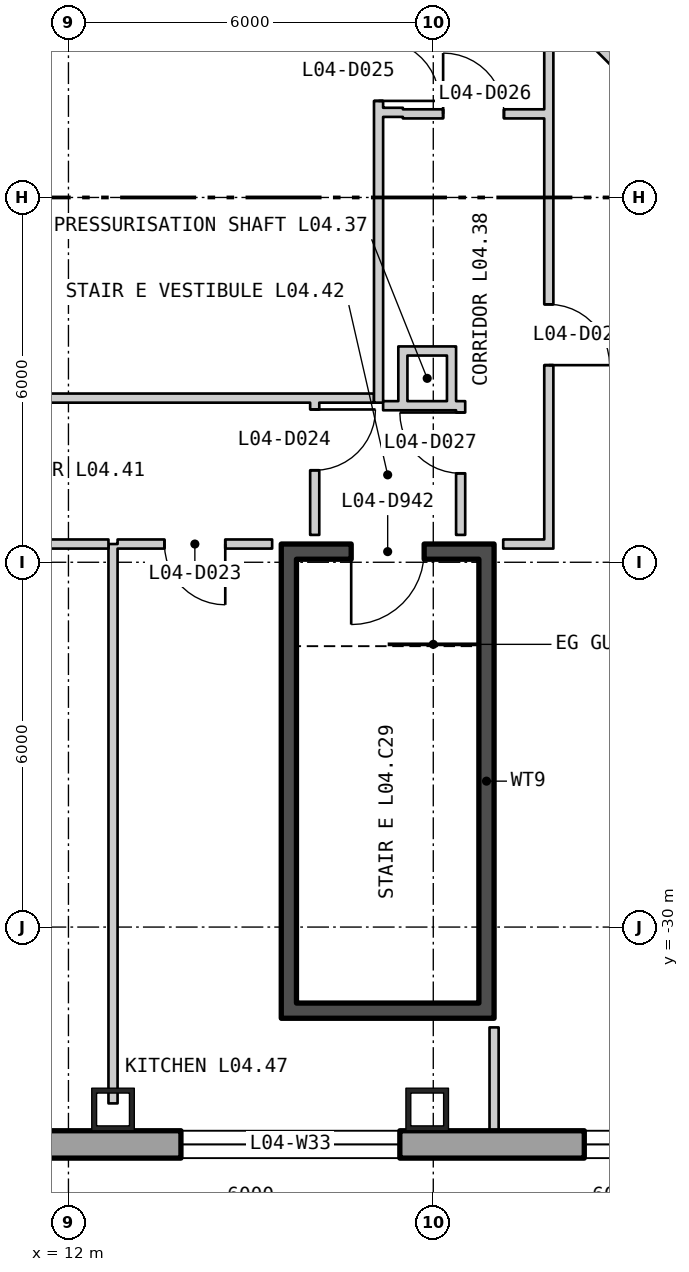
"""IFC4 building model, lengths in metres.
Left out: names, types, materials, properties, quantities, classifications, styles, units other than length and angle.
Written with IfcOpenShell. Run it as: python <this file> out.ifc"""

import sys

from ifc_helpers import new_model, si_unit, direction, frame, frame_2d, origin, origin_2d, place, context, subcontext, project, spatial, polyline, rectangle, hollow_rectangle, outline, extrude, element, fill, save


model = new_model("IFC4")
c1 = context("Model", 3, precision=1e-05, world=origin(), true_north=direction((0.0, 1.0)))
c2 = subcontext(c1, "Body", "Model", "MODEL_VIEW")
j1 = project(units=[si_unit("LENGTHUNIT", "METRE"), si_unit("PLANEANGLEUNIT", "RADIAN")], contexts=[c1])
p1 = place(None, origin())
s1 = spatial("IfcSite", under=j1, at=p1, CompositionType="ELEMENT")
p2 = place(p1, origin())
s2 = spatial("IfcBuilding", under=s1, at=p2, CompositionType="ELEMENT")
p3 = place(p2, frame((0.0, 0.0, 23.7)))
s3 = spatial("IfcBuildingStorey", under=s2, at=p3, CompositionType="ELEMENT", Elevation=23.7)
for number, where, z_axis, x_axis in (
    (1, (12.733, -33.0, 0.0), (0.0, 0.0, 1.0), (1.0, 0.0, 0.0)),
    (2, (17.9, -33.0, 0.0), (0.0, 0.0, 1.0), (1.0, 0.0, 0.0)),
):
    element("IfcColumn", number, at=place(p3, frame(where, z_axis=z_axis, x_axis=x_axis)), inside=s3, PredefinedType="COLUMN", context=c2, shape_type="SweptSolid", body=[
        extrude(hollow_rectangle(XDim=0.7, YDim=0.7, WallThickness=0.08, at=origin_2d()), origin(), (0.0, 0.0, 1.0), 4.85),
    ])
p4 = place(p3, frame((-38.775, -33.575, -0.4), z_axis=(0.0, 0.0, 1.0), x_axis=(1.0, 0.0, 0.0)))
e3 = element("IfcWall", 3, at=p4, inside=s3, PredefinedType="SOLIDWALL", context=c2, shape_type="SweptSolid", body=[
    extrude(outline(polyline([(-0.225, -0.225), (77.775, -0.225), (77.325, 0.225), (0.225, 0.225), (-0.225, -0.225)])), origin(), (0.0, 0.0, 1.0), 5.1),
])
p5 = place(p4, frame((1.958, 0.0, 1.3)))
e4 = element("IfcOpeningElement", 4, at=p5, cuts=e3, PredefinedType="OPENING", context=c2, shape_type="SweptSolid", body=[
    extrude(rectangle(XDim=3.6, YDim=3.2, at=frame_2d((1.8, 1.6))), frame((0.0, 0.235, 0.0), z_axis=(0.0, -1.0, 0.0), x_axis=(1.0, 0.0, 0.0)), (0.0, 0.0, 1.0), 0.47),
])
p6 = place(p4, frame((8.325, 0.0, 1.3)))
e5 = element("IfcOpeningElement", 5, at=p6, cuts=e3, PredefinedType="OPENING", context=c2, shape_type="SweptSolid", body=[
    extrude(rectangle(XDim=3.6, YDim=3.2, at=frame_2d((1.8, 1.6))), frame((0.0, 0.235, 0.0), z_axis=(0.0, -1.0, 0.0), x_axis=(1.0, 0.0, 0.0)), (0.0, 0.0, 1.0), 0.47),
])
p7 = place(p4, frame((14.692, 0.0, 1.3)))
e6 = element("IfcOpeningElement", 6, at=p7, cuts=e3, PredefinedType="OPENING", context=c2, shape_type="SweptSolid", body=[
    extrude(rectangle(XDim=3.6, YDim=3.2, at=frame_2d((1.8, 1.6))), frame((0.0, 0.235, 0.0), z_axis=(0.0, -1.0, 0.0), x_axis=(1.0, 0.0, 0.0)), (0.0, 0.0, 1.0), 0.47),
])
p8 = place(p4, frame((21.325, 0.0, 1.3)))
e7 = element("IfcOpeningElement", 7, at=p8, cuts=e3, PredefinedType="OPENING", context=c2, shape_type="SweptSolid", body=[
    extrude(rectangle(XDim=3.6, YDim=3.2, at=frame_2d((1.8, 1.6))), frame((0.0, 0.235, 0.0), z_axis=(0.0, -1.0, 0.0), x_axis=(1.0, 0.0, 0.0)), (0.0, 0.0, 1.0), 0.47),
])
p9 = place(p4, frame((27.425, 0.0, 1.3)))
e8 = element("IfcOpeningElement", 8, at=p9, cuts=e3, PredefinedType="OPENING", context=c2, shape_type="SweptSolid", body=[
    extrude(rectangle(XDim=3.6, YDim=3.2, at=frame_2d((1.8, 1.6))), frame((0.0, 0.235, 0.0), z_axis=(0.0, -1.0, 0.0), x_axis=(1.0, 0.0, 0.0)), (0.0, 0.0, 1.0), 0.47),
])
p10 = place(p4, frame((33.792, 0.0, 1.3)))
e9 = element("IfcOpeningElement", 9, at=p10, cuts=e3, PredefinedType="OPENING", context=c2, shape_type="SweptSolid", body=[
    extrude(rectangle(XDim=3.6, YDim=3.2, at=frame_2d((1.8, 1.6))), frame((0.0, 0.235, 0.0), z_axis=(0.0, -1.0, 0.0), x_axis=(1.0, 0.0, 0.0)), (0.0, 0.0, 1.0), 0.47),
])
p11 = place(p4, frame((40.158, 0.0, 1.3)))
e10 = element("IfcOpeningElement", 10, at=p11, cuts=e3, PredefinedType="OPENING", context=c2, shape_type="SweptSolid", body=[
    extrude(rectangle(XDim=3.6, YDim=3.2, at=frame_2d((1.8, 1.6))), frame((0.0, 0.235, 0.0), z_axis=(0.0, -1.0, 0.0), x_axis=(1.0, 0.0, 0.0)), (0.0, 0.0, 1.0), 0.47),
])
p12 = place(p4, frame((46.525, 0.0, 1.3)))
e11 = element("IfcOpeningElement", 11, at=p12, cuts=e3, PredefinedType="OPENING", context=c2, shape_type="SweptSolid", body=[
    extrude(rectangle(XDim=3.6, YDim=3.2, at=frame_2d((1.8, 1.6))), frame((0.0, 0.235, 0.0), z_axis=(0.0, -1.0, 0.0), x_axis=(1.0, 0.0, 0.0)), (0.0, 0.0, 1.0), 0.47),
])
p13 = place(p4, frame((52.625, 0.0, 1.3)))
e12 = element("IfcOpeningElement", 12, at=p13, cuts=e3, PredefinedType="OPENING", context=c2, shape_type="SweptSolid", body=[
    extrude(rectangle(XDim=3.6, YDim=3.2, at=frame_2d((1.8, 1.6))), frame((0.0, 0.235, 0.0), z_axis=(0.0, -1.0, 0.0), x_axis=(1.0, 0.0, 0.0)), (0.0, 0.0, 1.0), 0.47),
])
p14 = place(p4, frame((59.258, 0.0, 1.3)))
e13 = element("IfcOpeningElement", 13, at=p14, cuts=e3, PredefinedType="OPENING", context=c2, shape_type="SweptSolid", body=[
    extrude(rectangle(XDim=3.6, YDim=3.2, at=frame_2d((1.8, 1.6))), frame((0.0, 0.235, 0.0), z_axis=(0.0, -1.0, 0.0), x_axis=(1.0, 0.0, 0.0)), (0.0, 0.0, 1.0), 0.47),
])
p15 = place(p4, frame((65.625, 0.0, 1.3)))
e14 = element("IfcOpeningElement", 14, at=p15, cuts=e3, PredefinedType="OPENING", context=c2, shape_type="SweptSolid", body=[
    extrude(rectangle(XDim=3.6, YDim=3.2, at=frame_2d((1.8, 1.6))), frame((0.0, 0.235, 0.0), z_axis=(0.0, -1.0, 0.0), x_axis=(1.0, 0.0, 0.0)), (0.0, 0.0, 1.0), 0.47),
])
p16 = place(p4, frame((71.992, 0.0, 1.3)))
e15 = element("IfcOpeningElement", 15, at=p16, cuts=e3, PredefinedType="OPENING", context=c2, shape_type="SweptSolid", body=[
    extrude(rectangle(XDim=3.6, YDim=3.2, at=frame_2d((1.8, 1.6))), frame((0.0, 0.235, 0.0), z_axis=(0.0, -1.0, 0.0), x_axis=(1.0, 0.0, 0.0)), (0.0, 0.0, 1.0), 0.47),
])
for number, where, z_axis, x_axis in (
    (16, (15.625, -31.25, 0.0), (0.0, 0.0, 1.0), (0.0, 1.0, 0.0)),
    (17, (18.875, -31.25, 0.0), (0.0, 0.0, 1.0), (0.0, 1.0, 0.0)),
):
    element("IfcWall", number, at=place(p3, frame(where, z_axis=z_axis, x_axis=x_axis)), inside=s3, PredefinedType="SHEAR", context=c2, shape_type="SweptSolid", body=[
        extrude(rectangle(XDim=7.3, YDim=0.25, at=frame_2d((3.65, 0.0))), origin(), (0.0, 0.0, 1.0), 4.85),
    ])
p17 = place(p3, frame((15.5, -31.375, 0.0), z_axis=(0.0, 0.0, 1.0), x_axis=(1.0, 0.0, 0.0)))
e18 = element("IfcWall", 18, at=p17, inside=s3, PredefinedType="SHEAR", context=c2, shape_type="SweptSolid", body=[
    extrude(rectangle(XDim=3.5, YDim=0.25, at=frame_2d((1.75, 0.0))), origin(), (0.0, 0.0, 1.0), 4.85),
])
p18 = place(p3, frame((15.5, -23.825, 0.0), z_axis=(0.0, 0.0, 1.0), x_axis=(1.0, 0.0, 0.0)))
e19 = element("IfcWall", 19, at=p18, inside=s3, PredefinedType="SHEAR", context=c2, shape_type="SweptSolid", body=[
    extrude(rectangle(XDim=3.5, YDim=0.25, at=frame_2d((1.75, 0.0))), origin(), (0.0, 0.0, 1.0), 4.85),
])
p19 = place(p18, frame((1.15, 0.0, 0.0)))
e20 = element("IfcOpeningElement", 20, at=p19, cuts=e19, PredefinedType="OPENING", context=c2, shape_type="SweptSolid", body=[
    extrude(rectangle(XDim=1.2, YDim=2.1, at=frame_2d((0.6, 1.05))), frame((0.0, 0.135, 0.0), z_axis=(0.0, -1.0, 0.0), x_axis=(1.0, 0.0, 0.0)), (0.0, 0.0, 1.0), 0.27),
])
p20 = place(p3, frame((1.7, -21.3, 0.0), z_axis=(0.0, 0.0, 1.0), x_axis=(1.0, 0.0, 0.0)))
e21 = element("IfcWall", 21, at=p20, inside=s3, PredefinedType="PARTITIONING", context=c2, shape_type="SweptSolid", body=[
    extrude(rectangle(XDim=15.325, YDim=0.15, at=frame_2d((7.662, 0.0))), origin(), (0.0, 0.0, 1.0), 4.85),
])
p21 = place(p3, frame((6.442, -23.7, 0.0), z_axis=(0.0, 0.0, 1.0), x_axis=(1.0, 0.0, 0.0)))
e22 = element("IfcWall", 22, at=p21, inside=s3, PredefinedType="PARTITIONING", context=c2, shape_type="SweptSolid", body=[
    extrude(rectangle(XDim=6.216, YDim=0.15, at=frame_2d((3.108, 0.0))), origin(), (0.0, 0.0, 1.0), 4.85),
])
p22 = place(p21, frame((1.805, 0.0, 0.0)))
e23 = element("IfcOpeningElement", 23, at=p22, cuts=e22, PredefinedType="OPENING", context=c2, shape_type="SweptSolid", body=[
    extrude(rectangle(XDim=1.0, YDim=2.1, at=frame_2d((0.5, 1.05))), frame((0.0, 0.085, 0.0), z_axis=(0.0, -1.0, 0.0), x_axis=(1.0, 0.0, 0.0)), (0.0, 0.0, 1.0), 0.17),
])
p23 = place(p3, frame((12.733, -32.9, 0.0), z_axis=(0.0, 0.0, 1.0), x_axis=(0.0, 1.0, 0.0)))
e24 = element("IfcWall", 24, at=p23, inside=s3, PredefinedType="PARTITIONING", context=c2, shape_type="SweptSolid", body=[
    extrude(rectangle(XDim=9.2, YDim=0.15, at=frame_2d((4.6, 0.0))), origin(), (0.0, 0.0, 1.0), 4.16),
])
p24 = place(p3, frame((12.808, -23.7, 0.0), z_axis=(0.0, 0.0, 1.0), x_axis=(1.0, 0.0, 0.0)))
e25 = element("IfcWall", 25, at=p24, inside=s3, PredefinedType="PARTITIONING", context=c2, shape_type="SweptSolid", body=[
    extrude(rectangle(XDim=2.542, YDim=0.15, at=frame_2d((1.271, 0.0))), origin(), (0.0, 0.0, 1.0), 4.85),
])
p25 = place(p24, frame((0.771, 0.0, 0.0)))
e26 = element("IfcOpeningElement", 26, at=p25, cuts=e25, PredefinedType="OPENING", context=c2, shape_type="SweptSolid", body=[
    extrude(rectangle(XDim=1.0, YDim=2.1, at=frame_2d((0.5, 1.05))), frame((0.0, 0.085, 0.0), z_axis=(0.0, -1.0, 0.0), x_axis=(1.0, 0.0, 0.0)), (0.0, 0.0, 1.0), 0.17),
])
p26 = place(p3, frame((16.05, -23.55, 0.0), z_axis=(0.0, 0.0, 1.0), x_axis=(0.0, 1.0, 0.0)))
e27 = element("IfcWall", 27, at=p26, inside=s3, PredefinedType="PARTITIONING", context=c2, shape_type="SweptSolid", body=[
    extrude(rectangle(XDim=2.175, YDim=0.15, at=frame_2d((1.087, 0.0))), origin(), (0.0, 0.0, 1.0), 4.16),
])
p27 = place(p26, frame((1.063, 0.0, 0.0)))
e28 = element("IfcOpeningElement", 28, at=p27, cuts=e27, PredefinedType="OPENING", context=c2, shape_type="SweptSolid", body=[
    extrude(rectangle(XDim=1.0, YDim=2.1, at=frame_2d((0.5, 1.05))), frame((0.0, 0.085, 0.0), z_axis=(0.0, -1.0, 0.0), x_axis=(1.0, 0.0, 0.0)), (0.0, 0.0, 1.0), 0.17),
])
p28 = place(p3, frame((17.1, -21.375, 0.0), z_axis=(0.0, 0.0, 1.0), x_axis=(0.0, 1.0, 0.0)))
e29 = element("IfcWall", 29, at=p28, inside=s3, PredefinedType="PARTITIONING", context=c2, shape_type="SweptSolid", body=[
    extrude(rectangle(XDim=19.05, YDim=0.15, at=frame_2d((9.525, 0.0))), origin(), (0.0, 0.0, 1.0), 4.85),
])
p29 = place(p28, frame((4.963, 0.0, 0.0)))
e30 = element("IfcOpeningElement", 30, at=p29, cuts=e29, PredefinedType="OPENING", context=c2, shape_type="SweptSolid", body=[
    extrude(rectangle(XDim=1.0, YDim=2.1, at=frame_2d((0.5, 1.05))), frame((0.0, 0.085, 0.0), z_axis=(0.0, -1.0, 0.0), x_axis=(1.0, 0.0, 0.0)), (0.0, 0.0, 1.0), 0.17),
])
p30 = place(p3, frame((17.175, -21.425, 0.0), z_axis=(0.0, 0.0, 1.0), x_axis=(1.0, 0.0, 0.0)))
e31 = element("IfcWall", 31, at=p30, inside=s3, PredefinedType="PARTITIONING", context=c2, shape_type="SweptSolid", body=[
    extrude(rectangle(XDim=0.25, YDim=0.15, at=frame_2d((0.125, 0.0))), origin(), (0.0, 0.0, 1.0), 4.85),
])
p31 = place(p3, frame((17.175, -16.6, 0.0), z_axis=(0.0, 0.0, 1.0), x_axis=(1.0, 0.0, 0.0)))
e32 = element("IfcWall", 32, at=p31, inside=s3, PredefinedType="PARTITIONING", context=c2, shape_type="SweptSolid", body=[
    extrude(rectangle(XDim=0.325, YDim=0.15, at=frame_2d((0.163, 0.0))), origin(), (0.0, 0.0, 1.0), 4.85),
])
p32 = place(p3, frame((17.5, -21.5, 0.0), z_axis=(0.0, 0.0, 1.0), x_axis=(0.0, 1.0, 0.0)))
e33 = element("IfcWall", 33, at=p32, inside=s3, PredefinedType="PARTITIONING", context=c2, shape_type="SweptSolid", body=[
    extrude(rectangle(XDim=1.05, YDim=0.15, at=frame_2d((0.525, 0.0))), origin(), (0.0, 0.0, 1.0), 4.85),
])
p33 = place(p3, frame((17.5, -16.625, 0.0), z_axis=(0.0, 0.0, 1.0), x_axis=(1.0, 0.0, 0.0)))
e34 = element("IfcWall", 34, at=p33, inside=s3, PredefinedType="PARTITIONING", context=c2, shape_type="SweptSolid", body=[
    extrude(rectangle(XDim=2.325, YDim=0.15, at=frame_2d((1.163, 0.0))), origin(), (0.0, 0.0, 1.0), 4.85),
])
p34 = place(p33, frame((0.662, 0.0, 0.0)))
e35 = element("IfcOpeningElement", 35, at=p34, cuts=e34, PredefinedType="OPENING", context=c2, shape_type="SweptSolid", body=[
    extrude(rectangle(XDim=1.0, YDim=2.1, at=frame_2d((0.5, 1.05))), frame((0.0, 0.085, 0.0), z_axis=(0.0, -1.0, 0.0), x_axis=(1.0, 0.0, 0.0)), (0.0, 0.0, 1.0), 0.17),
])
for number, where, z_axis, x_axis in (
    (36, (17.575, -21.425, 0.0), (0.0, 0.0, 1.0), (1.0, 0.0, 0.0)),
    (37, (17.575, -20.525, 0.0), (0.0, 0.0, 1.0), (1.0, 0.0, 0.0)),
):
    element("IfcWall", number, at=place(p3, frame(where, z_axis=z_axis, x_axis=x_axis)), inside=s3, PredefinedType="PARTITIONING", context=c2, shape_type="SweptSolid", body=[
        extrude(rectangle(XDim=0.65, YDim=0.15, at=frame_2d((0.325, 0.0))), origin(), (0.0, 0.0, 1.0), 4.85),
    ])
p35 = place(p3, frame((18.3, -21.5, 0.0), z_axis=(0.0, 0.0, 1.0), x_axis=(0.0, 1.0, 0.0)))
e38 = element("IfcWall", 38, at=p35, inside=s3, PredefinedType="PARTITIONING", context=c2, shape_type="SweptSolid", body=[
    extrude(rectangle(XDim=1.05, YDim=0.15, at=frame_2d((0.525, 0.0))), origin(), (0.0, 0.0, 1.0), 4.85),
])
p36 = place(p3, frame((18.45, -23.55, 0.0), z_axis=(0.0, 0.0, 1.0), x_axis=(0.0, 1.0, 0.0)))
e39 = element("IfcWall", 39, at=p36, inside=s3, PredefinedType="PARTITIONING", context=c2, shape_type="SweptSolid", body=[
    extrude(rectangle(XDim=2.2, YDim=0.15, at=frame_2d((1.1, 0.0))), origin(), (0.0, 0.0, 1.0), 4.85),
])
p37 = place(p36, frame((1.013, 0.0, 0.0)))
e40 = element("IfcOpeningElement", 40, at=p37, cuts=e39, PredefinedType="OPENING", context=c2, shape_type="SweptSolid", body=[
    extrude(rectangle(XDim=1.0, YDim=2.1, at=frame_2d((0.5, 1.05))), frame((0.0, 0.085, 0.0), z_axis=(0.0, -1.0, 0.0), x_axis=(1.0, 0.0, 0.0)), (0.0, 0.0, 1.0), 0.17),
])
p38 = place(p3, frame((19.0, -33.348, 0.0), z_axis=(0.0, 0.0, 1.0), x_axis=(0.0, 1.0, 0.0)))
e41 = element("IfcWall", 41, at=p38, inside=s3, PredefinedType="PARTITIONING", context=c2, shape_type="SweptSolid", body=[
    extrude(rectangle(XDim=0.448, YDim=0.15, at=frame_2d((0.224, 0.0))), origin(), (0.0, 0.0, 1.0), 4.85),
])
p39 = place(p3, frame((19.0, -32.9, 0.0), z_axis=(0.0, 0.0, 1.0), x_axis=(0.0, 1.0, 0.0)))
e42 = element("IfcWall", 42, at=p39, inside=s3, PredefinedType="PARTITIONING", context=c2, shape_type="SweptSolid", body=[
    extrude(rectangle(XDim=1.25, YDim=0.15, at=frame_2d((0.625, 0.0))), origin(), (0.0, 0.0, 1.0), 4.16),
])
p40 = place(p3, frame((19.15, -23.7, 0.0), z_axis=(0.0, 0.0, 1.0), x_axis=(1.0, 0.0, 0.0)))
e43 = element("IfcWall", 43, at=p40, inside=s3, PredefinedType="PARTITIONING", context=c2, shape_type="SweptSolid", body=[
    extrude(rectangle(XDim=0.675, YDim=0.15, at=frame_2d((0.338, 0.0))), origin(), (0.0, 0.0, 1.0), 4.85),
])
p41 = place(p3, frame((19.9, -23.775, 0.0), z_axis=(0.0, 0.0, 1.0), x_axis=(0.0, 1.0, 0.0)))
e44 = element("IfcWall", 44, at=p41, inside=s3, PredefinedType="PARTITIONING", context=c2, shape_type="SweptSolid", body=[
    extrude(rectangle(XDim=21.187, YDim=0.15, at=frame_2d((10.594, 0.0))), origin(), (0.0, 0.0, 1.0), 4.85),
])
p42 = place(p41, frame((3.017, 0.0, 0.0)))
e45 = element("IfcOpeningElement", 45, at=p42, cuts=e44, PredefinedType="OPENING", context=c2, shape_type="SweptSolid", body=[
    extrude(rectangle(XDim=1.0, YDim=2.1, at=frame_2d((0.5, 1.05))), frame((0.0, 0.085, 0.0), z_axis=(0.0, -1.0, 0.0), x_axis=(1.0, 0.0, 0.0)), (0.0, 0.0, 1.0), 0.17),
])
p43 = place(p41, frame((12.423, 0.0, 0.0)))
e46 = element("IfcOpeningElement", 46, at=p43, cuts=e44, PredefinedType="OPENING", context=c2, shape_type="SweptSolid", body=[
    extrude(rectangle(XDim=1.0, YDim=2.1, at=frame_2d((0.5, 1.05))), frame((0.0, 0.085, 0.0), z_axis=(0.0, -1.0, 0.0), x_axis=(1.0, 0.0, 0.0)), (0.0, 0.0, 1.0), 0.17),
])
p44 = place(p3, frame((20.028, -14.827, 0.0), z_axis=(0.0, 0.0, 1.0), x_axis=(0.707106781187, -0.707106781187, 0.0)))
e47 = element("IfcWall", 47, at=p44, inside=s3, PredefinedType="PARTITIONING", context=c2, shape_type="SweptSolid", body=[
    extrude(rectangle(XDim=7.068, YDim=0.15, at=frame_2d((3.534, 0.0))), origin(), (0.0, 0.0, 1.0), 4.85),
])
p45 = place(p13, origin())
e48 = element("IfcWindow", 48, at=p45, inside=s3, PartitioningType="SINGLE_PANEL", PredefinedType="WINDOW", context=c2, shape_type="SweptSolid", body=[
    extrude(rectangle(XDim=3.6, YDim=3.2, at=frame_2d((1.8, 1.6))), frame((0.0, 0.105, 0.0), z_axis=(0.0, -1.0, 0.0), x_axis=(1.0, 0.0, 0.0)), (0.0, 0.0, 1.0), 0.06),
])
fill(e12, e48)
p46 = place(p14, origin())
e49 = element("IfcWindow", 49, at=p46, inside=s3, PartitioningType="SINGLE_PANEL", PredefinedType="WINDOW", context=c2, shape_type="SweptSolid", body=[
    extrude(rectangle(XDim=3.6, YDim=3.2, at=frame_2d((1.8, 1.6))), frame((0.0, 0.105, 0.0), z_axis=(0.0, -1.0, 0.0), x_axis=(1.0, 0.0, 0.0)), (0.0, 0.0, 1.0), 0.06),
])
fill(e13, e49)
p47 = place(p19, origin())
e50 = element("IfcDoor", 50, at=p47, inside=s3, OperationType="SINGLE_SWING_LEFT", PredefinedType="DOOR", context=c2, shape_type="SweptSolid", body=[
    extrude(rectangle(XDim=1.2, YDim=2.1, at=frame_2d((0.6, 1.05))), frame((0.0, 0.025, 0.0), z_axis=(0.0, -1.0, 0.0), x_axis=(1.0, 0.0, 0.0)), (0.0, 0.0, 1.0), 0.05),
])
fill(e20, e50)
p48 = place(p25, origin())
e51 = element("IfcDoor", 51, at=p48, inside=s3, OperationType="SINGLE_SWING_RIGHT", PredefinedType="DOOR", context=c2, shape_type="SweptSolid", body=[
    extrude(rectangle(XDim=1.0, YDim=2.1, at=frame_2d((0.5, 1.05))), frame((0.0, 0.025, 0.0), z_axis=(0.0, -1.0, 0.0), x_axis=(1.0, 0.0, 0.0)), (0.0, 0.0, 1.0), 0.05),
])
fill(e26, e51)
p49 = place(p27, origin())
e52 = element("IfcDoor", 52, at=p49, inside=s3, OperationType="SINGLE_SWING_RIGHT", PredefinedType="DOOR", context=c2, shape_type="SweptSolid", body=[
    extrude(rectangle(XDim=1.0, YDim=2.1, at=frame_2d((0.5, 1.05))), frame((0.0, 0.025, 0.0), z_axis=(0.0, -1.0, 0.0), x_axis=(1.0, 0.0, 0.0)), (0.0, 0.0, 1.0), 0.05),
])
fill(e28, e52)
p50 = place(p29, origin())
e53 = element("IfcDoor", 53, at=p50, inside=s3, OperationType="SINGLE_SWING_LEFT", PredefinedType="DOOR", context=c2, shape_type="SweptSolid", body=[
    extrude(rectangle(XDim=1.0, YDim=2.1, at=frame_2d((0.5, 1.05))), frame((0.0, 0.025, 0.0), z_axis=(0.0, -1.0, 0.0), x_axis=(1.0, 0.0, 0.0)), (0.0, 0.0, 1.0), 0.05),
])
fill(e30, e53)
p51 = place(p34, origin())
e54 = element("IfcDoor", 54, at=p51, inside=s3, OperationType="SINGLE_SWING_RIGHT", PredefinedType="DOOR", context=c2, shape_type="SweptSolid", body=[
    extrude(rectangle(XDim=1.0, YDim=2.1, at=frame_2d((0.5, 1.05))), frame((0.0, 0.025, 0.0), z_axis=(0.0, -1.0, 0.0), x_axis=(1.0, 0.0, 0.0)), (0.0, 0.0, 1.0), 0.05),
])
fill(e35, e54)
p52 = place(p37, origin())
e55 = element("IfcDoor", 55, at=p52, inside=s3, OperationType="SINGLE_SWING_LEFT", PredefinedType="DOOR", context=c2, shape_type="SweptSolid", body=[
    extrude(rectangle(XDim=1.0, YDim=2.1, at=frame_2d((0.5, 1.05))), frame((0.0, 0.025, 0.0), z_axis=(0.0, -1.0, 0.0), x_axis=(1.0, 0.0, 0.0)), (0.0, 0.0, 1.0), 0.05),
])
fill(e40, e55)
p53 = place(p42, origin())
e56 = element("IfcDoor", 56, at=p53, inside=s3, OperationType="SINGLE_SWING_LEFT", PredefinedType="DOOR", context=c2, shape_type="SweptSolid", body=[
    extrude(rectangle(XDim=1.0, YDim=2.1, at=frame_2d((0.5, 1.05))), frame((0.0, 0.025, 0.0), z_axis=(0.0, -1.0, 0.0), x_axis=(1.0, 0.0, 0.0)), (0.0, 0.0, 1.0), 0.05),
])
fill(e45, e56)
save(model, sys.argv[1])
